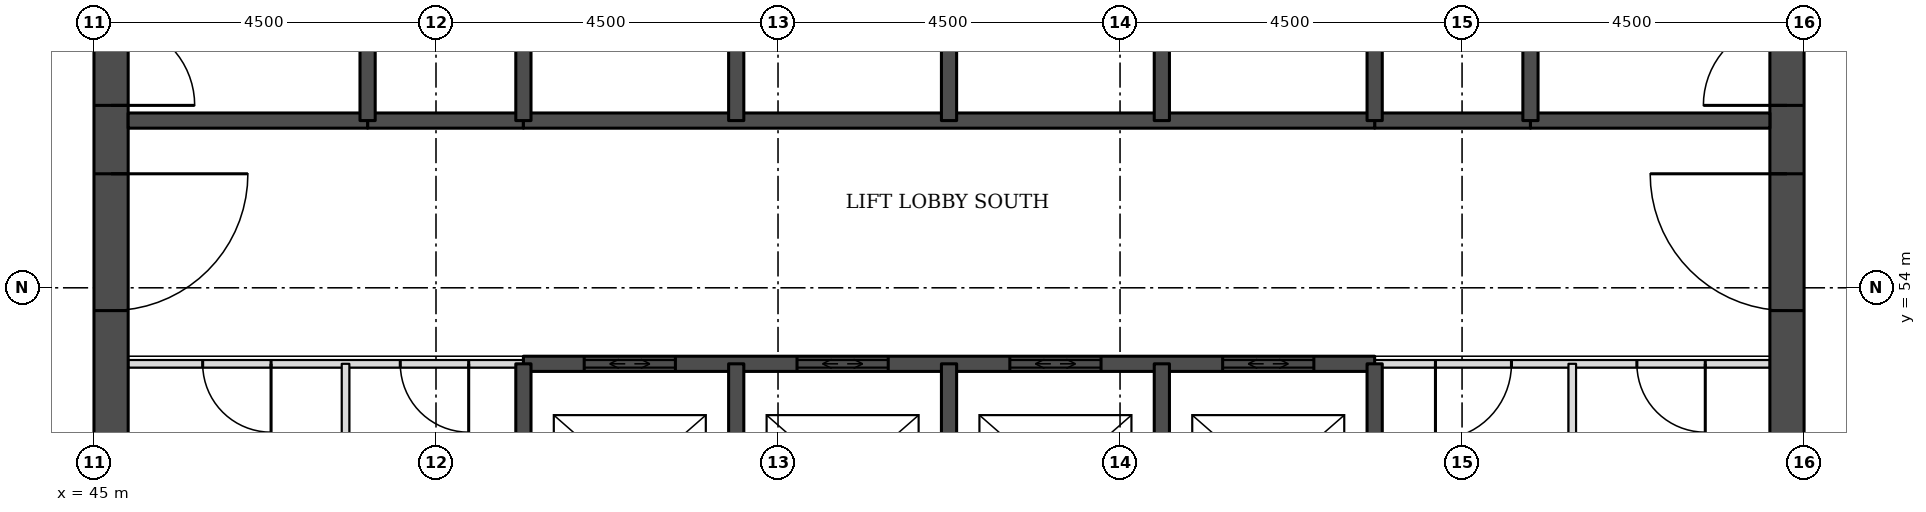
"""IFC4 building model, lengths in metres.
Left out: names, types, materials, properties, quantities, classifications, styles, units other than length and angle.
Written with IfcOpenShell. Run it as: python <this file> out.ifc"""

import sys

from ifc_helpers import new_model, si_unit, direction, frame, frame_2d, origin, place, context, subcontext, project, spatial, rectangle, extrude, element, fill, save


model = new_model("IFC4")
c1 = context("Model", 3, precision=1e-05, world=origin(), true_north=direction((0.0, 1.0)))
c2 = subcontext(c1, "Body", "Model", "MODEL_VIEW")
j1 = project(units=[si_unit("LENGTHUNIT", "METRE"), si_unit("PLANEANGLEUNIT", "RADIAN")], contexts=[c1])
p1 = place(None, origin())
s1 = spatial("IfcSite", under=j1, at=p1, CompositionType="ELEMENT")
p2 = place(p1, origin())
s2 = spatial("IfcBuilding", under=s1, at=p2, CompositionType="ELEMENT")
p3 = place(p2, frame((0.0, 0.0, 108.5)))
s3 = spatial("IfcBuildingStorey", under=s2, at=p3, CompositionType="ELEMENT", Elevation=108.5)
p4 = place(p3, frame((45.225, 49.5, 0.0), z_axis=(0.0, 0.0, 1.0), x_axis=(0.0, 1.0, 0.0)))
e1 = element("IfcWall", 1, at=p4, inside=s3, PredefinedType="SHEAR", context=c2, shape_type="SweptSolid", body=[
    extrude(rectangle(XDim=22.5, YDim=0.45, at=frame_2d((11.25, 0.0))), origin(), (0.0, 0.0, 1.0), 3.7),
])
p5 = place(p4, frame((4.2, 0.0, 0.0)))
e2 = element("IfcOpeningElement", 2, at=p5, cuts=e1, PredefinedType="OPENING", context=c2, shape_type="SweptSolid", body=[
    extrude(rectangle(XDim=1.8, YDim=2.1, at=frame_2d((0.9, 1.05))), frame((0.0, 0.235, 0.0), z_axis=(0.0, -1.0, 0.0), x_axis=(1.0, 0.0, 0.0)), (0.0, 0.0, 1.0), 0.47),
])
p6 = place(p4, frame((6.9, 0.0, 0.0)))
e3 = element("IfcOpeningElement", 3, at=p6, cuts=e1, PredefinedType="OPENING", context=c2, shape_type="SweptSolid", body=[
    extrude(rectangle(XDim=1.1, YDim=2.1, at=frame_2d((0.55, 1.05))), frame((0.0, 0.235, 0.0), z_axis=(0.0, -1.0, 0.0), x_axis=(1.0, 0.0, 0.0)), (0.0, 0.0, 1.0), 0.47),
])
p7 = place(p4, frame((13.6, 0.0, 0.0)))
e4 = element("IfcOpeningElement", 4, at=p7, cuts=e1, PredefinedType="OPENING", context=c2, shape_type="SweptSolid", body=[
    extrude(rectangle(XDim=1.1, YDim=2.1, at=frame_2d((0.55, 1.05))), frame((0.0, 0.235, 0.0), z_axis=(0.0, -1.0, 0.0), x_axis=(1.0, 0.0, 0.0)), (0.0, 0.0, 1.0), 0.47),
])
p8 = place(p4, frame((16.5, 0.0, 0.0)))
e5 = element("IfcOpeningElement", 5, at=p8, cuts=e1, PredefinedType="OPENING", context=c2, shape_type="SweptSolid", body=[
    extrude(rectangle(XDim=1.8, YDim=2.1, at=frame_2d((0.9, 1.05))), frame((0.0, 0.235, 0.0), z_axis=(0.0, -1.0, 0.0), x_axis=(1.0, 0.0, 0.0)), (0.0, 0.0, 1.0), 0.47),
])
p9 = place(p3, frame((67.275, 49.5, 0.0), z_axis=(0.0, 0.0, 1.0), x_axis=(0.0, 1.0, 0.0)))
e6 = element("IfcWall", 6, at=p9, inside=s3, PredefinedType="SHEAR", context=c2, shape_type="SweptSolid", body=[
    extrude(rectangle(XDim=22.5, YDim=0.45, at=frame_2d((11.25, 0.0))), origin(), (0.0, 0.0, 1.0), 3.7),
])
p10 = place(p9, frame((4.2, 0.0, 0.0)))
e7 = element("IfcOpeningElement", 7, at=p10, cuts=e6, PredefinedType="OPENING", context=c2, shape_type="SweptSolid", body=[
    extrude(rectangle(XDim=1.8, YDim=2.1, at=frame_2d((0.9, 1.05))), frame((0.0, 0.235, 0.0), z_axis=(0.0, -1.0, 0.0), x_axis=(1.0, 0.0, 0.0)), (0.0, 0.0, 1.0), 0.47),
])
p11 = place(p9, frame((6.9, 0.0, 0.0)))
e8 = element("IfcOpeningElement", 8, at=p11, cuts=e6, PredefinedType="OPENING", context=c2, shape_type="SweptSolid", body=[
    extrude(rectangle(XDim=1.1, YDim=2.1, at=frame_2d((0.55, 1.05))), frame((0.0, 0.235, 0.0), z_axis=(0.0, -1.0, 0.0), x_axis=(1.0, 0.0, 0.0)), (0.0, 0.0, 1.0), 0.47),
])
p12 = place(p9, frame((13.6, 0.0, 0.0)))
e9 = element("IfcOpeningElement", 9, at=p12, cuts=e6, PredefinedType="OPENING", context=c2, shape_type="SweptSolid", body=[
    extrude(rectangle(XDim=1.1, YDim=2.1, at=frame_2d((0.55, 1.05))), frame((0.0, 0.235, 0.0), z_axis=(0.0, -1.0, 0.0), x_axis=(1.0, 0.0, 0.0)), (0.0, 0.0, 1.0), 0.47),
])
p13 = place(p9, frame((16.5, 0.0, 0.0)))
e10 = element("IfcOpeningElement", 10, at=p13, cuts=e6, PredefinedType="OPENING", context=c2, shape_type="SweptSolid", body=[
    extrude(rectangle(XDim=1.8, YDim=2.1, at=frame_2d((0.9, 1.05))), frame((0.0, 0.235, 0.0), z_axis=(0.0, -1.0, 0.0), x_axis=(1.0, 0.0, 0.0)), (0.0, 0.0, 1.0), 0.47),
])
p14 = place(p3, frame((45.45, 53.0, 0.0), z_axis=(0.0, 0.0, 1.0), x_axis=(1.0, 0.0, 0.0)))
e11 = element("IfcWall", 11, at=p14, inside=s3, PredefinedType="PARTITIONING", context=c2, shape_type="SweptSolid", body=[
    extrude(rectangle(XDim=5.2, YDim=0.1, at=frame_2d((2.6, 0.0))), origin(), (0.0, 0.0, 1.0), 3.55),
])
p15 = place(p14, frame((0.98, 0.0, 0.0)))
e12 = element("IfcOpeningElement", 12, at=p15, cuts=e11, PredefinedType="OPENING", context=c2, shape_type="SweptSolid", body=[
    extrude(rectangle(XDim=0.9, YDim=2.1, at=frame_2d((0.45, 1.05))), frame((0.0, 0.06, 0.0), z_axis=(0.0, -1.0, 0.0), x_axis=(1.0, 0.0, 0.0)), (0.0, 0.0, 1.0), 0.12),
])
p16 = place(p14, frame((3.58, 0.0, 0.0)))
e13 = element("IfcOpeningElement", 13, at=p16, cuts=e11, PredefinedType="OPENING", context=c2, shape_type="SweptSolid", body=[
    extrude(rectangle(XDim=0.9, YDim=2.1, at=frame_2d((0.45, 1.05))), frame((0.0, 0.06, 0.0), z_axis=(0.0, -1.0, 0.0), x_axis=(1.0, 0.0, 0.0)), (0.0, 0.0, 1.0), 0.12),
])
p17 = place(p3, frame((61.85, 53.0, 0.0), z_axis=(0.0, 0.0, 1.0), x_axis=(1.0, 0.0, 0.0)))
e14 = element("IfcWall", 14, at=p17, inside=s3, PredefinedType="PARTITIONING", context=c2, shape_type="SweptSolid", body=[
    extrude(rectangle(XDim=5.2, YDim=0.1, at=frame_2d((2.6, 0.0))), origin(), (0.0, 0.0, 1.0), 3.55),
])
p18 = place(p17, frame((3.45, 0.0, 0.0)))
e15 = element("IfcOpeningElement", 15, at=p18, cuts=e14, PredefinedType="OPENING", context=c2, shape_type="SweptSolid", body=[
    extrude(rectangle(XDim=0.9, YDim=2.1, at=frame_2d((0.45, 1.05))), frame((0.0, 0.06, 0.0), z_axis=(0.0, -1.0, 0.0), x_axis=(1.0, 0.0, 0.0)), (0.0, 0.0, 1.0), 0.12),
])
p19 = place(p17, frame((0.8, 0.0, 0.0)))
e16 = element("IfcOpeningElement", 16, at=p19, cuts=e14, PredefinedType="OPENING", context=c2, shape_type="SweptSolid", body=[
    extrude(rectangle(XDim=1.0, YDim=2.1, at=frame_2d((0.5, 1.05))), frame((0.0, 0.06, 0.0), z_axis=(0.0, -1.0, 0.0), x_axis=(1.0, 0.0, 0.0)), (0.0, 0.0, 1.0), 0.12),
])
p20 = place(p3, frame((50.65, 53.0, 0.0), z_axis=(0.0, 0.0, 1.0), x_axis=(1.0, 0.0, 0.0)))
e17 = element("IfcWall", 17, at=p20, inside=s3, PredefinedType="SOLIDWALL", context=c2, shape_type="SweptSolid", body=[
    extrude(rectangle(XDim=11.2, YDim=0.2, at=frame_2d((5.6, 0.0))), origin(), (0.0, 0.0, 1.0), 3.55),
])
p21 = place(p20, frame((0.8, 0.0, 0.0)))
e18 = element("IfcOpeningElement", 18, at=p21, cuts=e17, PredefinedType="OPENING", context=c2, shape_type="SweptSolid", body=[
    extrude(rectangle(XDim=1.2, YDim=2.1, at=frame_2d((0.6, 1.05))), frame((0.0, 0.11, 0.0), z_axis=(0.0, -1.0, 0.0), x_axis=(1.0, 0.0, 0.0)), (0.0, 0.0, 1.0), 0.22),
])
p22 = place(p20, frame((3.6, 0.0, 0.0)))
e19 = element("IfcOpeningElement", 19, at=p22, cuts=e17, PredefinedType="OPENING", context=c2, shape_type="SweptSolid", body=[
    extrude(rectangle(XDim=1.2, YDim=2.1, at=frame_2d((0.6, 1.05))), frame((0.0, 0.11, 0.0), z_axis=(0.0, -1.0, 0.0), x_axis=(1.0, 0.0, 0.0)), (0.0, 0.0, 1.0), 0.22),
])
p23 = place(p20, frame((6.4, 0.0, 0.0)))
e20 = element("IfcOpeningElement", 20, at=p23, cuts=e17, PredefinedType="OPENING", context=c2, shape_type="SweptSolid", body=[
    extrude(rectangle(XDim=1.2, YDim=2.1, at=frame_2d((0.6, 1.05))), frame((0.0, 0.11, 0.0), z_axis=(0.0, -1.0, 0.0), x_axis=(1.0, 0.0, 0.0)), (0.0, 0.0, 1.0), 0.22),
])
p24 = place(p20, frame((9.2, 0.0, 0.0)))
e21 = element("IfcOpeningElement", 21, at=p24, cuts=e17, PredefinedType="OPENING", context=c2, shape_type="SweptSolid", body=[
    extrude(rectangle(XDim=1.2, YDim=2.1, at=frame_2d((0.6, 1.05))), frame((0.0, 0.11, 0.0), z_axis=(0.0, -1.0, 0.0), x_axis=(1.0, 0.0, 0.0)), (0.0, 0.0, 1.0), 0.22),
])
for number, where, z_axis, x_axis in (
    (22, (48.6, 56.2, 0.0), (0.0, 0.0, 1.0), (1.0, 0.0, 0.0)),
    (23, (61.85, 56.2, 0.0), (0.0, 0.0, 1.0), (1.0, 0.0, 0.0)),
):
    element("IfcWall", number, at=place(p3, frame(where, z_axis=z_axis, x_axis=x_axis)), inside=s3, PredefinedType="SOLIDWALL", context=c2, shape_type="SweptSolid", body=[
        extrude(rectangle(XDim=2.05, YDim=0.2, at=frame_2d((1.025, 0.0))), origin(), (0.0, 0.0, 1.0), 3.55),
    ])
p25 = place(p3, frame((45.45, 56.2, 0.0), z_axis=(0.0, 0.0, 1.0), x_axis=(1.0, 0.0, 0.0)))
e24 = element("IfcWall", 24, at=p25, inside=s3, PredefinedType="SOLIDWALL", context=c2, shape_type="SweptSolid", body=[
    extrude(rectangle(XDim=3.15, YDim=0.2, at=frame_2d((1.575, 0.0))), origin(), (0.0, 0.0, 1.0), 3.55),
])
p26 = place(p3, frame((50.65, 56.2, 0.0), z_axis=(0.0, 0.0, 1.0), x_axis=(1.0, 0.0, 0.0)))
e25 = element("IfcWall", 25, at=p26, inside=s3, PredefinedType="SOLIDWALL", context=c2, shape_type="SweptSolid", body=[
    extrude(rectangle(XDim=11.2, YDim=0.2, at=frame_2d((5.6, 0.0))), origin(), (0.0, 0.0, 1.0), 3.55),
])
p27 = place(p3, frame((63.9, 56.2, 0.0), z_axis=(0.0, 0.0, 1.0), x_axis=(1.0, 0.0, 0.0)))
e26 = element("IfcWall", 26, at=p27, inside=s3, PredefinedType="SOLIDWALL", context=c2, shape_type="SweptSolid", body=[
    extrude(rectangle(XDim=3.15, YDim=0.2, at=frame_2d((1.575, 0.0))), origin(), (0.0, 0.0, 1.0), 3.55),
])
p28 = place(p3, frame((48.31, 49.95, 0.0), z_axis=(0.0, 0.0, 1.0), x_axis=(0.0, 1.0, 0.0)))
e27 = element("IfcWall", 27, at=p28, inside=s3, PredefinedType="PARTITIONING", context=c2, shape_type="SweptSolid", body=[
    extrude(rectangle(XDim=3.05, YDim=0.1, at=frame_2d((1.525, 0.0))), origin(), (0.0, 0.0, 1.0), 3.55),
])
p29 = place(p3, frame((48.6, 56.2, 0.0), z_axis=(0.0, 0.0, 1.0), x_axis=(0.0, 1.0, 0.0)))
e28 = element("IfcWall", 28, at=p29, inside=s3, PredefinedType="SOLIDWALL", context=c2, shape_type="SweptSolid", body=[
    extrude(rectangle(XDim=5.8, YDim=0.2, at=frame_2d((2.9, 0.0))), origin(), (0.0, 0.0, 1.0), 3.55),
])
p30 = place(p3, frame((50.65, 49.95, 0.0), z_axis=(0.0, 0.0, 1.0), x_axis=(0.0, 1.0, 0.0)))
e29 = element("IfcWall", 29, at=p30, inside=s3, PredefinedType="SOLIDWALL", context=c2, shape_type="SweptSolid", body=[
    extrude(rectangle(XDim=3.05, YDim=0.2, at=frame_2d((1.525, 0.0))), origin(), (0.0, 0.0, 1.0), 3.55),
])
p31 = place(p3, frame((50.65, 56.2, 0.0), z_axis=(0.0, 0.0, 1.0), x_axis=(0.0, 1.0, 0.0)))
e30 = element("IfcWall", 30, at=p31, inside=s3, PredefinedType="SOLIDWALL", context=c2, shape_type="SweptSolid", body=[
    extrude(rectangle(XDim=2.8, YDim=0.2, at=frame_2d((1.4, 0.0))), origin(), (0.0, 0.0, 1.0), 3.55),
])
p32 = place(p3, frame((53.45, 49.95, 0.0), z_axis=(0.0, 0.0, 1.0), x_axis=(0.0, 1.0, 0.0)))
e31 = element("IfcWall", 31, at=p32, inside=s3, PredefinedType="SOLIDWALL", context=c2, shape_type="SweptSolid", body=[
    extrude(rectangle(XDim=3.05, YDim=0.2, at=frame_2d((1.525, 0.0))), origin(), (0.0, 0.0, 1.0), 3.55),
])
p33 = place(p3, frame((53.45, 56.2, 0.0), z_axis=(0.0, 0.0, 1.0), x_axis=(0.0, 1.0, 0.0)))
e32 = element("IfcWall", 32, at=p33, inside=s3, PredefinedType="SOLIDWALL", context=c2, shape_type="SweptSolid", body=[
    extrude(rectangle(XDim=2.8, YDim=0.2, at=frame_2d((1.4, 0.0))), origin(), (0.0, 0.0, 1.0), 3.55),
])
p34 = place(p3, frame((56.25, 49.95, 0.0), z_axis=(0.0, 0.0, 1.0), x_axis=(0.0, 1.0, 0.0)))
e33 = element("IfcWall", 33, at=p34, inside=s3, PredefinedType="SOLIDWALL", context=c2, shape_type="SweptSolid", body=[
    extrude(rectangle(XDim=3.05, YDim=0.2, at=frame_2d((1.525, 0.0))), origin(), (0.0, 0.0, 1.0), 3.55),
])
p35 = place(p3, frame((56.25, 56.2, 0.0), z_axis=(0.0, 0.0, 1.0), x_axis=(0.0, 1.0, 0.0)))
e34 = element("IfcWall", 34, at=p35, inside=s3, PredefinedType="SOLIDWALL", context=c2, shape_type="SweptSolid", body=[
    extrude(rectangle(XDim=2.8, YDim=0.2, at=frame_2d((1.4, 0.0))), origin(), (0.0, 0.0, 1.0), 3.55),
])
p36 = place(p3, frame((59.05, 49.95, 0.0), z_axis=(0.0, 0.0, 1.0), x_axis=(0.0, 1.0, 0.0)))
e35 = element("IfcWall", 35, at=p36, inside=s3, PredefinedType="SOLIDWALL", context=c2, shape_type="SweptSolid", body=[
    extrude(rectangle(XDim=3.05, YDim=0.2, at=frame_2d((1.525, 0.0))), origin(), (0.0, 0.0, 1.0), 3.55),
])
p37 = place(p3, frame((59.05, 56.2, 0.0), z_axis=(0.0, 0.0, 1.0), x_axis=(0.0, 1.0, 0.0)))
e36 = element("IfcWall", 36, at=p37, inside=s3, PredefinedType="SOLIDWALL", context=c2, shape_type="SweptSolid", body=[
    extrude(rectangle(XDim=2.8, YDim=0.2, at=frame_2d((1.4, 0.0))), origin(), (0.0, 0.0, 1.0), 3.55),
])
p38 = place(p3, frame((61.85, 49.95, 0.0), z_axis=(0.0, 0.0, 1.0), x_axis=(0.0, 1.0, 0.0)))
e37 = element("IfcWall", 37, at=p38, inside=s3, PredefinedType="SOLIDWALL", context=c2, shape_type="SweptSolid", body=[
    extrude(rectangle(XDim=3.05, YDim=0.2, at=frame_2d((1.525, 0.0))), origin(), (0.0, 0.0, 1.0), 3.55),
])
p39 = place(p3, frame((61.85, 56.2, 0.0), z_axis=(0.0, 0.0, 1.0), x_axis=(0.0, 1.0, 0.0)))
e38 = element("IfcWall", 38, at=p39, inside=s3, PredefinedType="SOLIDWALL", context=c2, shape_type="SweptSolid", body=[
    extrude(rectangle(XDim=2.8, YDim=0.2, at=frame_2d((1.4, 0.0))), origin(), (0.0, 0.0, 1.0), 3.55),
])
p40 = place(p3, frame((63.9, 56.2, 0.0), z_axis=(0.0, 0.0, 1.0), x_axis=(0.0, 1.0, 0.0)))
e39 = element("IfcWall", 39, at=p40, inside=s3, PredefinedType="SOLIDWALL", context=c2, shape_type="SweptSolid", body=[
    extrude(rectangle(XDim=5.8, YDim=0.2, at=frame_2d((2.9, 0.0))), origin(), (0.0, 0.0, 1.0), 3.55),
])
p41 = place(p3, frame((64.45, 49.95, 0.0), z_axis=(0.0, 0.0, 1.0), x_axis=(0.0, 1.0, 0.0)))
e40 = element("IfcWall", 40, at=p41, inside=s3, PredefinedType="PARTITIONING", context=c2, shape_type="SweptSolid", body=[
    extrude(rectangle(XDim=3.05, YDim=0.1, at=frame_2d((1.525, 0.0))), origin(), (0.0, 0.0, 1.0), 3.55),
])
p42 = place(p21, origin())
e41 = element("IfcDoor", 41, at=p42, inside=s3, OperationType="DOUBLE_DOOR_SLIDING", PredefinedType="DOOR", context=c2, shape_type="SweptSolid", body=[
    extrude(rectangle(XDim=1.2, YDim=2.1, at=frame_2d((0.6, 1.05))), frame((0.0, 0.025, 0.0), z_axis=(0.0, -1.0, 0.0), x_axis=(1.0, 0.0, 0.0)), (0.0, 0.0, 1.0), 0.05),
])
fill(e18, e41)
p43 = place(p22, origin())
e42 = element("IfcDoor", 42, at=p43, inside=s3, OperationType="DOUBLE_DOOR_SLIDING", PredefinedType="DOOR", context=c2, shape_type="SweptSolid", body=[
    extrude(rectangle(XDim=1.2, YDim=2.1, at=frame_2d((0.6, 1.05))), frame((0.0, 0.025, 0.0), z_axis=(0.0, -1.0, 0.0), x_axis=(1.0, 0.0, 0.0)), (0.0, 0.0, 1.0), 0.05),
])
fill(e19, e42)
p44 = place(p23, origin())
e43 = element("IfcDoor", 43, at=p44, inside=s3, OperationType="DOUBLE_DOOR_SLIDING", PredefinedType="DOOR", context=c2, shape_type="SweptSolid", body=[
    extrude(rectangle(XDim=1.2, YDim=2.1, at=frame_2d((0.6, 1.05))), frame((0.0, 0.025, 0.0), z_axis=(0.0, -1.0, 0.0), x_axis=(1.0, 0.0, 0.0)), (0.0, 0.0, 1.0), 0.05),
])
fill(e20, e43)
p45 = place(p24, origin())
e44 = element("IfcDoor", 44, at=p45, inside=s3, OperationType="DOUBLE_DOOR_SLIDING", PredefinedType="DOOR", context=c2, shape_type="SweptSolid", body=[
    extrude(rectangle(XDim=1.2, YDim=2.1, at=frame_2d((0.6, 1.05))), frame((0.0, 0.025, 0.0), z_axis=(0.0, -1.0, 0.0), x_axis=(1.0, 0.0, 0.0)), (0.0, 0.0, 1.0), 0.05),
])
fill(e21, e44)
p46 = place(p5, frame((1.8, 0.0, 0.0), z_axis=(0.0, 0.0, 1.0), x_axis=(-1.0, 0.0, 0.0)))
e45 = element("IfcDoor", 45, at=p46, inside=s3, OperationType="SINGLE_SWING_LEFT", PredefinedType="DOOR", context=c2, shape_type="SweptSolid", body=[
    extrude(rectangle(XDim=1.8, YDim=2.1, at=frame_2d((0.9, 1.05))), frame((0.0, 0.025, 0.0), z_axis=(0.0, -1.0, 0.0), x_axis=(1.0, 0.0, 0.0)), (0.0, 0.0, 1.0), 0.05),
])
fill(e2, e45)
p47 = place(p6, frame((1.1, 0.0, 0.0), z_axis=(0.0, 0.0, 1.0), x_axis=(-1.0, 0.0, 0.0)))
e46 = element("IfcDoor", 46, at=p47, inside=s3, OperationType="SINGLE_SWING_RIGHT", PredefinedType="DOOR", context=c2, shape_type="SweptSolid", body=[
    extrude(rectangle(XDim=1.1, YDim=2.1, at=frame_2d((0.55, 1.05))), frame((0.0, 0.025, 0.0), z_axis=(0.0, -1.0, 0.0), x_axis=(1.0, 0.0, 0.0)), (0.0, 0.0, 1.0), 0.05),
])
fill(e3, e46)
p48 = place(p10, origin())
e47 = element("IfcDoor", 47, at=p48, inside=s3, OperationType="SINGLE_SWING_RIGHT", PredefinedType="DOOR", context=c2, shape_type="SweptSolid", body=[
    extrude(rectangle(XDim=1.8, YDim=2.1, at=frame_2d((0.9, 1.05))), frame((0.0, 0.025, 0.0), z_axis=(0.0, -1.0, 0.0), x_axis=(1.0, 0.0, 0.0)), (0.0, 0.0, 1.0), 0.05),
])
fill(e7, e47)
p49 = place(p11, origin())
e48 = element("IfcDoor", 48, at=p49, inside=s3, OperationType="SINGLE_SWING_LEFT", PredefinedType="DOOR", context=c2, shape_type="SweptSolid", body=[
    extrude(rectangle(XDim=1.1, YDim=2.1, at=frame_2d((0.55, 1.05))), frame((0.0, 0.025, 0.0), z_axis=(0.0, -1.0, 0.0), x_axis=(1.0, 0.0, 0.0)), (0.0, 0.0, 1.0), 0.05),
])
fill(e8, e48)
p50 = place(p18, frame((0.9, 0.0, 0.0), z_axis=(0.0, 0.0, 1.0), x_axis=(-1.0, 0.0, 0.0)))
e49 = element("IfcDoor", 49, at=p50, inside=s3, OperationType="SINGLE_SWING_LEFT", PredefinedType="DOOR", context=c2, shape_type="SweptSolid", body=[
    extrude(rectangle(XDim=0.9, YDim=2.1, at=frame_2d((0.45, 1.05))), frame((0.0, 0.025, 0.0), z_axis=(0.0, -1.0, 0.0), x_axis=(1.0, 0.0, 0.0)), (0.0, 0.0, 1.0), 0.05),
])
fill(e15, e49)
p51 = place(p19, frame((1.0, 0.0, 0.0), z_axis=(0.0, 0.0, 1.0), x_axis=(-1.0, 0.0, 0.0)))
e50 = element("IfcDoor", 50, at=p51, inside=s3, OperationType="SINGLE_SWING_RIGHT", PredefinedType="DOOR", context=c2, shape_type="SweptSolid", body=[
    extrude(rectangle(XDim=1.0, YDim=2.1, at=frame_2d((0.5, 1.05))), frame((0.0, 0.025, 0.0), z_axis=(0.0, -1.0, 0.0), x_axis=(1.0, 0.0, 0.0)), (0.0, 0.0, 1.0), 0.05),
])
fill(e16, e50)
p52 = place(p15, frame((0.9, 0.0, 0.0), z_axis=(0.0, 0.0, 1.0), x_axis=(-1.0, 0.0, 0.0)))
e51 = element("IfcDoor", 51, at=p52, inside=s3, OperationType="SINGLE_SWING_LEFT", PredefinedType="DOOR", context=c2, shape_type="SweptSolid", body=[
    extrude(rectangle(XDim=0.9, YDim=2.1, at=frame_2d((0.45, 1.05))), frame((0.0, 0.025, 0.0), z_axis=(0.0, -1.0, 0.0), x_axis=(1.0, 0.0, 0.0)), (0.0, 0.0, 1.0), 0.05),
])
fill(e12, e51)
p53 = place(p16, frame((0.9, 0.0, 0.0), z_axis=(0.0, 0.0, 1.0), x_axis=(-1.0, 0.0, 0.0)))
e52 = element("IfcDoor", 52, at=p53, inside=s3, OperationType="SINGLE_SWING_LEFT", PredefinedType="DOOR", context=c2, shape_type="SweptSolid", body=[
    extrude(rectangle(XDim=0.9, YDim=2.1, at=frame_2d((0.45, 1.05))), frame((0.0, 0.025, 0.0), z_axis=(0.0, -1.0, 0.0), x_axis=(1.0, 0.0, 0.0)), (0.0, 0.0, 1.0), 0.05),
])
fill(e13, e52)
save(model, sys.argv[1])
